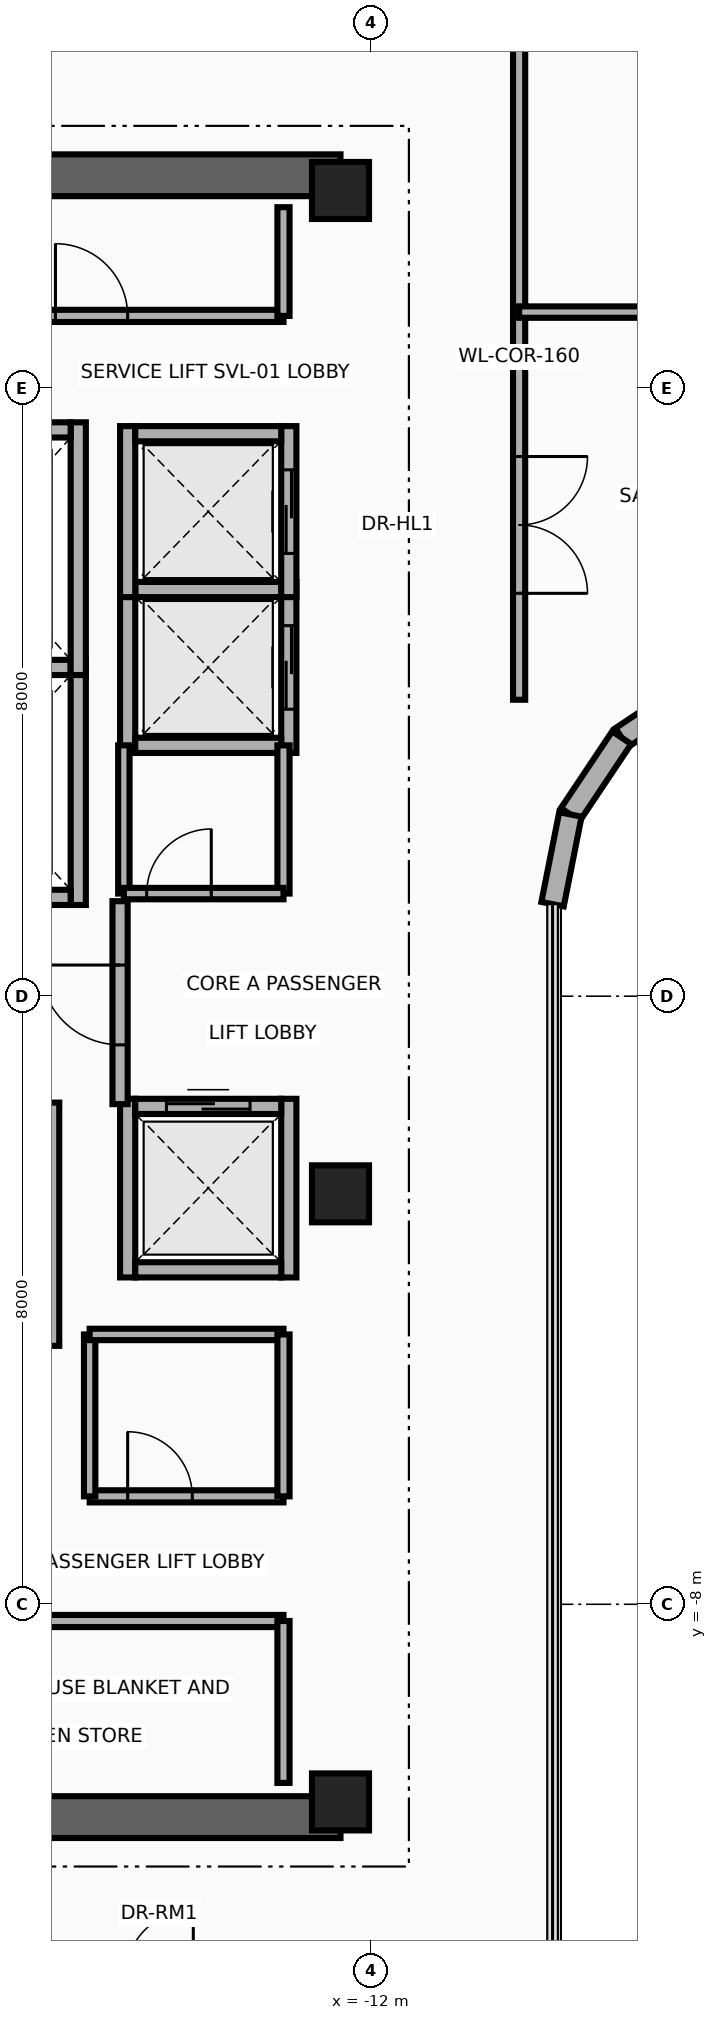
"""IFC4 building model, lengths in metres.
Left out: names, types, materials, properties, quantities, classifications, styles, units other than length and angle.
Written with IfcOpenShell. Run it as: python <this file> out.ifc"""

import sys

from ifc_helpers import new_model, si_unit, direction, frame, frame_2d, origin, origin_2d, place, context, subcontext, project, spatial, rectangle, extrude, source, transform, mapped, element, fill, save


model = new_model("IFC4")
c1 = context("Model", 3, precision=1e-05, world=origin(), true_north=direction((0.0, 1.0)))
c2 = subcontext(c1, "Body", "Model", "MODEL_VIEW")
j1 = project(units=[si_unit("LENGTHUNIT", "METRE"), si_unit("PLANEANGLEUNIT", "RADIAN")], contexts=[c1])
p1 = place(None, origin())
s1 = spatial("IfcSite", under=j1, at=p1, CompositionType="ELEMENT")
p2 = place(p1, origin())
s2 = spatial("IfcBuilding", under=s1, at=p2, CompositionType="ELEMENT")
p3 = place(p2, frame((0.0, 0.0, 290.6)))
s3 = spatial("IfcBuildingStorey", under=s2, at=p3, CompositionType="ELEMENT", Elevation=290.6)
for number, where, z_axis, x_axis in (
    (1, (-22.65, 10.8, 0.0), (0.0, 0.0, 1.0), (1.0, 0.0, 0.0)),
    (2, (-22.65, -10.8, 0.0), (0.0, 0.0, 1.0), (1.0, 0.0, 0.0)),
):
    element("IfcWall", number, at=place(p3, frame(where, z_axis=z_axis, x_axis=x_axis)), inside=s3, PredefinedType="SHEAR", context=c2, shape_type="SweptSolid", body=[
        extrude(rectangle(XDim=10.25, YDim=0.55, at=frame_2d((5.125, 0.0))), origin(), (0.0, 0.0, 1.0), 3.36),
    ])
m1 = source(origin(), c2, "Body", "SweptSolid", [
    extrude(rectangle(XDim=0.75, YDim=0.75, at=origin_2d()), origin(), (0.0, 0.0, 1.0), 3.6),
])
for number, where, z_axis, x_axis in (
    (3, (-12.4, -10.6, 0.0), (0.0, 0.0, 1.0), (1.0, 0.0, 0.0)),
    (4, (-12.4, -2.6, 0.0), (0.0, 0.0, 1.0), (1.0, 0.0, 0.0)),
    (5, (-12.4, 10.6, 0.0), (0.0, 0.0, 1.0), (1.0, 0.0, 0.0)),
):
    element("IfcColumn", number, at=place(p3, frame(where, z_axis=z_axis, x_axis=x_axis)), inside=s3, PredefinedType="COLUMN", context=c2, shape_type="MappedRepresentation", body=[
        mapped(m1, transform((0.0, 0.0, 0.0), x_axis=(1.0, 0.0, 0.0), y_axis=(0.0, 1.0, 0.0), z_axis=(0.0, 0.0, 1.0), scale=1.0)),
    ])
p4 = place(p3, frame((-7.691, 4.075, 0.0), z_axis=(0.0, 0.0, 1.0), x_axis=(-0.83152410926, -0.555488663899, 0.0)))
e6 = element("IfcWall", 6, at=p4, inside=s3, PredefinedType="SOLIDWALL", context=c2, shape_type="SweptSolid", body=[
    extrude(rectangle(XDim=1.214, YDim=0.3, at=frame_2d((0.607, 0.0))), origin(), (0.0, 0.0, 1.0), 3.36),
])
p5 = place(p3, frame((-8.701, 3.401, 0.0), z_axis=(0.0, 0.0, 1.0), x_axis=(-0.555581539313, -0.831462057568, 0.0)))
e7 = element("IfcWall", 7, at=p5, inside=s3, PredefinedType="SOLIDWALL", context=c2, shape_type="SweptSolid", body=[
    extrude(rectangle(XDim=1.214, YDim=0.3, at=frame_2d((0.607, 0.0))), origin(), (0.0, 0.0, 1.0), 3.36),
])
p6 = place(p3, frame((-9.375, 2.391, 0.0), z_axis=(0.0, 0.0, 1.0), x_axis=(-0.195140802248, -0.98077523791, 0.0)))
e8 = element("IfcWall", 8, at=p6, inside=s3, PredefinedType="SOLIDWALL", context=c2, shape_type="SweptSolid", body=[
    extrude(rectangle(XDim=1.204, YDim=0.3, at=frame_2d((0.602, 0.0))), origin(), (0.0, 0.0, 1.0), 3.36),
])
p7 = place(p3, frame((-15.85, 1.2, 0.0), z_axis=(0.0, 0.0, 1.0), x_axis=(0.0, 1.0, 0.0)))
e9 = element("IfcWall", 9, at=p7, inside=s3, PredefinedType="MOVABLE", context=c2, shape_type="SweptSolid", body=[
    extrude(rectangle(XDim=3.225, YDim=0.2, at=frame_2d((1.613, 0.0))), origin(), (0.0, 0.0, 1.0), 3.36),
])
p8 = place(p3, frame((-18.55, 1.3, 0.0), z_axis=(0.0, 0.0, 1.0), x_axis=(1.0, 0.0, 0.0)))
e10 = element("IfcWall", 10, at=p8, inside=s3, PredefinedType="MOVABLE", context=c2, shape_type="SweptSolid", body=[
    extrude(rectangle(XDim=2.6, YDim=0.2, at=frame_2d((1.3, 0.0))), origin(), (0.0, 0.0, 1.0), 3.36),
])
p9 = place(p8, frame((0.7, 0.0, 0.0)))
e11 = element("IfcOpeningElement", 11, at=p9, cuts=e10, PredefinedType="OPENING", context=c2, shape_type="SweptSolid", body=[
    extrude(rectangle(XDim=1.2, YDim=2.1, at=frame_2d((0.6, 1.05))), frame((0.0, 0.115, 0.0), z_axis=(0.0, -1.0, 0.0), x_axis=(1.0, 0.0, 0.0)), (0.0, 0.0, 1.0), 0.23),
])
p10 = place(p3, frame((-18.55, 4.325, 0.0), z_axis=(0.0, 0.0, 1.0), x_axis=(1.0, 0.0, 0.0)))
e12 = element("IfcWall", 12, at=p10, inside=s3, PredefinedType="MOVABLE", context=c2, shape_type="SweptSolid", body=[
    extrude(rectangle(XDim=2.6, YDim=0.2, at=frame_2d((1.3, 0.0))), origin(), (0.0, 0.0, 1.0), 3.36),
])
p11 = place(p3, frame((-16.2, -4.6, 0.0), z_axis=(0.0, 0.0, 1.0), x_axis=(0.0, 1.0, 0.0)))
e13 = element("IfcWall", 13, at=p11, inside=s3, PredefinedType="MOVABLE", context=c2, shape_type="SweptSolid", body=[
    extrude(rectangle(XDim=3.2, YDim=0.2, at=frame_2d((1.6, 0.0))), origin(), (0.0, 0.0, 1.0), 3.36),
])
p12 = place(p3, frame((-15.85, 4.225, 0.0), z_axis=(0.0, 0.0, 1.0), x_axis=(0.0, 1.0, 0.0)))
e14 = element("IfcWall", 14, at=p12, inside=s3, PredefinedType="MOVABLE", context=c2, shape_type="SweptSolid", body=[
    extrude(rectangle(XDim=3.325, YDim=0.2, at=frame_2d((1.663, 0.0))), origin(), (0.0, 0.0, 1.0), 3.36),
])
p13 = place(p3, frame((-18.55, 7.45, 0.0), z_axis=(0.0, 0.0, 1.0), x_axis=(1.0, 0.0, 0.0)))
e15 = element("IfcWall", 15, at=p13, inside=s3, PredefinedType="MOVABLE", context=c2, shape_type="SweptSolid", body=[
    extrude(rectangle(XDim=2.6, YDim=0.2, at=frame_2d((1.3, 0.0))), origin(), (0.0, 0.0, 1.0), 3.36),
])
p14 = place(p13, frame((0.7, 0.0, 0.0)))
e16 = element("IfcOpeningElement", 16, at=p14, cuts=e15, PredefinedType="OPENING", context=c2, shape_type="SweptSolid", body=[
    extrude(rectangle(XDim=1.2, YDim=2.1, at=frame_2d((0.6, 1.05))), frame((0.0, 0.115, 0.0), z_axis=(0.0, -1.0, 0.0), x_axis=(1.0, 0.0, 0.0)), (0.0, 0.0, 1.0), 0.23),
])
p15 = place(p3, frame((-15.2, 3.2, 0.0), z_axis=(0.0, 0.0, 1.0), x_axis=(0.0, 1.0, 0.0)))
e17 = element("IfcWall", 17, at=p15, inside=s3, PredefinedType="MOVABLE", context=c2, shape_type="SweptSolid", body=[
    extrude(rectangle(XDim=2.25, YDim=0.2, at=frame_2d((1.125, 0.0))), origin(), (0.0, 0.0, 1.0), 3.36),
])
p16 = place(p3, frame((-13.08, 3.2, 0.0), z_axis=(0.0, 0.0, 1.0), x_axis=(0.0, 1.0, 0.0)))
e18 = element("IfcWall", 18, at=p16, inside=s3, PredefinedType="MOVABLE", context=c2, shape_type="SweptSolid", body=[
    extrude(rectangle(XDim=2.25, YDim=0.2, at=frame_2d((1.125, 0.0))), origin(), (0.0, 0.0, 1.0), 3.36),
])
p17 = place(p16, frame((0.575, 0.0, 0.0)))
e19 = element("IfcOpeningElement", 19, at=p17, cuts=e18, PredefinedType="OPENING", context=c2, shape_type="SweptSolid", body=[
    extrude(rectangle(XDim=1.1, YDim=2.1, at=frame_2d((0.55, 1.05))), frame((0.0, 0.115, 0.0), z_axis=(0.0, -1.0, 0.0), x_axis=(1.0, 0.0, 0.0)), (0.0, 0.0, 1.0), 0.23),
])
for number, where, z_axis, x_axis in (
    (20, (-15.1, 3.3, 0.0), (0.0, 0.0, 1.0), (1.0, 0.0, 0.0)),
    (21, (-15.1, 5.35, 0.0), (0.0, 0.0, 1.0), (1.0, 0.0, 0.0)),
):
    element("IfcWall", number, at=place(p3, frame(where, z_axis=z_axis, x_axis=x_axis)), inside=s3, PredefinedType="MOVABLE", context=c2, shape_type="SweptSolid", body=[
        extrude(rectangle(XDim=1.92, YDim=0.2, at=frame_2d((0.96, 0.0))), origin(), (0.0, 0.0, 1.0), 3.36),
    ])
p18 = place(p3, frame((-15.2, 5.25, 0.0), z_axis=(0.0, 0.0, 1.0), x_axis=(0.0, 1.0, 0.0)))
e22 = element("IfcWall", 22, at=p18, inside=s3, PredefinedType="MOVABLE", context=c2, shape_type="SweptSolid", body=[
    extrude(rectangle(XDim=2.25, YDim=0.2, at=frame_2d((1.125, 0.0))), origin(), (0.0, 0.0, 1.0), 3.36),
])
p19 = place(p3, frame((-13.08, 5.25, 0.0), z_axis=(0.0, 0.0, 1.0), x_axis=(0.0, 1.0, 0.0)))
e23 = element("IfcWall", 23, at=p19, inside=s3, PredefinedType="MOVABLE", context=c2, shape_type="SweptSolid", body=[
    extrude(rectangle(XDim=2.25, YDim=0.2, at=frame_2d((1.125, 0.0))), origin(), (0.0, 0.0, 1.0), 3.36),
])
p20 = place(p19, frame((0.575, 0.0, 0.0)))
e24 = element("IfcOpeningElement", 24, at=p20, cuts=e23, PredefinedType="OPENING", context=c2, shape_type="SweptSolid", body=[
    extrude(rectangle(XDim=1.1, YDim=2.1, at=frame_2d((0.55, 1.05))), frame((0.0, 0.115, 0.0), z_axis=(0.0, -1.0, 0.0), x_axis=(1.0, 0.0, 0.0)), (0.0, 0.0, 1.0), 0.23),
])
p21 = place(p3, frame((-15.1, 7.4, 0.0), z_axis=(0.0, 0.0, 1.0), x_axis=(1.0, 0.0, 0.0)))
e25 = element("IfcWall", 25, at=p21, inside=s3, PredefinedType="MOVABLE", context=c2, shape_type="SweptSolid", body=[
    extrude(rectangle(XDim=1.92, YDim=0.2, at=frame_2d((0.96, 0.0))), origin(), (0.0, 0.0, 1.0), 3.36),
])
for number, where, z_axis, x_axis in (
    (26, (-15.2, -3.7, 0.0), (0.0, 0.0, 1.0), (0.0, 1.0, 0.0)),
    (27, (-13.08, -3.7, 0.0), (0.0, 0.0, 1.0), (0.0, 1.0, 0.0)),
):
    element("IfcWall", number, at=place(p3, frame(where, z_axis=z_axis, x_axis=x_axis)), inside=s3, PredefinedType="MOVABLE", context=c2, shape_type="SweptSolid", body=[
        extrude(rectangle(XDim=2.35, YDim=0.2, at=frame_2d((1.175, 0.0))), origin(), (0.0, 0.0, 1.0), 3.36),
    ])
p22 = place(p3, frame((-15.1, -3.6, 0.0), z_axis=(0.0, 0.0, 1.0), x_axis=(1.0, 0.0, 0.0)))
e28 = element("IfcWall", 28, at=p22, inside=s3, PredefinedType="MOVABLE", context=c2, shape_type="SweptSolid", body=[
    extrude(rectangle(XDim=1.92, YDim=0.2, at=frame_2d((0.96, 0.0))), origin(), (0.0, 0.0, 1.0), 3.36),
])
p23 = place(p3, frame((-15.1, -1.45, 0.0), z_axis=(0.0, 0.0, 1.0), x_axis=(1.0, 0.0, 0.0)))
e29 = element("IfcWall", 29, at=p23, inside=s3, PredefinedType="MOVABLE", context=c2, shape_type="SweptSolid", body=[
    extrude(rectangle(XDim=1.92, YDim=0.2, at=frame_2d((0.96, 0.0))), origin(), (0.0, 0.0, 1.0), 3.36),
])
p24 = place(p23, frame((0.41, 0.0, 0.0)))
e30 = element("IfcOpeningElement", 30, at=p24, cuts=e29, PredefinedType="OPENING", context=c2, shape_type="SweptSolid", body=[
    extrude(rectangle(XDim=1.1, YDim=2.1, at=frame_2d((0.55, 1.05))), frame((0.0, 0.115, 0.0), z_axis=(0.0, -1.0, 0.0), x_axis=(1.0, 0.0, 0.0)), (0.0, 0.0, 1.0), 0.23),
])
p25 = place(p3, frame((-15.3, -1.42, 0.0), z_axis=(0.0, 0.0, 1.0), x_axis=(0.0, 1.0, 0.0)))
e31 = element("IfcWall", 31, at=p25, inside=s3, PredefinedType="PARTITIONING", context=c2, shape_type="SweptSolid", body=[
    extrude(rectangle(XDim=2.67, YDim=0.2, at=frame_2d((1.335, 0.0))), origin(), (0.0, 0.0, 1.0), 3.36),
])
p26 = place(p25, frame((0.78, 0.0, 0.0)))
e32 = element("IfcOpeningElement", 32, at=p26, cuts=e31, PredefinedType="OPENING", context=c2, shape_type="SweptSolid", body=[
    extrude(rectangle(XDim=1.05, YDim=2.15, at=frame_2d((0.525, 1.075))), frame((0.0, 0.115, 0.0), z_axis=(0.0, -1.0, 0.0), x_axis=(1.0, 0.0, 0.0)), (0.0, 0.0, 1.0), 0.23),
])
p27 = place(p3, frame((-18.65, 8.95, 0.0), z_axis=(0.0, 0.0, 1.0), x_axis=(1.0, 0.0, 0.0)))
e33 = element("IfcWall", 33, at=p27, inside=s3, PredefinedType="PARTITIONING", context=c2, shape_type="SweptSolid", body=[
    extrude(rectangle(XDim=5.5, YDim=0.16, at=frame_2d((2.75, 0.0))), origin(), (0.0, 0.0, 1.0), 3.36),
])
p28 = place(p27, frame((0.3, 0.0, 0.0)))
e34 = element("IfcOpeningElement", 34, at=p28, cuts=e33, PredefinedType="OPENING", context=c2, shape_type="SweptSolid", body=[
    extrude(rectangle(XDim=0.85, YDim=2.05, at=frame_2d((0.425, 1.025))), frame((0.0, 0.095, 0.0), z_axis=(0.0, -1.0, 0.0), x_axis=(1.0, 0.0, 0.0)), (0.0, 0.0, 1.0), 0.19),
])
p29 = place(p27, frame((2.5, 0.0, 0.0)))
e35 = element("IfcOpeningElement", 35, at=p29, cuts=e33, PredefinedType="OPENING", context=c2, shape_type="SweptSolid", body=[
    extrude(rectangle(XDim=0.95, YDim=2.15, at=frame_2d((0.475, 1.075))), frame((0.0, 0.095, 0.0), z_axis=(0.0, -1.0, 0.0), x_axis=(1.0, 0.0, 0.0)), (0.0, 0.0, 1.0), 0.19),
])
p30 = place(p3, frame((-13.15, 8.95, 0.0), z_axis=(0.0, 0.0, 1.0), x_axis=(0.0, 1.0, 0.0)))
e36 = element("IfcWall", 36, at=p30, inside=s3, PredefinedType="PARTITIONING", context=c2, shape_type="SweptSolid", body=[
    extrude(rectangle(XDim=1.43, YDim=0.16, at=frame_2d((0.715, 0.0))), origin(), (0.0, 0.0, 1.0), 3.36),
])
p31 = place(p3, frame((-18.55, -8.22, 0.0), z_axis=(0.0, 0.0, 1.0), x_axis=(1.0, 0.0, 0.0)))
e37 = element("IfcWall", 37, at=p31, inside=s3, PredefinedType="PARTITIONING", context=c2, shape_type="SweptSolid", body=[
    extrude(rectangle(XDim=5.4, YDim=0.16, at=frame_2d((2.7, 0.0))), origin(), (0.0, 0.0, 1.0), 3.36),
])
p32 = place(p31, frame((1.15, 0.0, 0.0)))
e38 = element("IfcOpeningElement", 38, at=p32, cuts=e37, PredefinedType="OPENING", context=c2, shape_type="SweptSolid", body=[
    extrude(rectangle(XDim=0.95, YDim=2.15, at=frame_2d((0.475, 1.075))), frame((0.0, 0.095, 0.0), z_axis=(0.0, -1.0, 0.0), x_axis=(1.0, 0.0, 0.0)), (0.0, 0.0, 1.0), 0.19),
])
p33 = place(p3, frame((-13.15, -10.35, 0.0), z_axis=(0.0, 0.0, 1.0), x_axis=(0.0, 1.0, 0.0)))
e39 = element("IfcWall", 39, at=p33, inside=s3, PredefinedType="PARTITIONING", context=c2, shape_type="SweptSolid", body=[
    extrude(rectangle(XDim=2.13, YDim=0.16, at=frame_2d((1.065, 0.0))), origin(), (0.0, 0.0, 1.0), 3.36),
])
p34 = place(p3, frame((-15.7, -6.58, 0.0), z_axis=(0.0, 0.0, 1.0), x_axis=(1.0, 0.0, 0.0)))
e40 = element("IfcWall", 40, at=p34, inside=s3, PredefinedType="PARTITIONING", context=c2, shape_type="SweptSolid", body=[
    extrude(rectangle(XDim=2.55, YDim=0.16, at=frame_2d((1.275, 0.0))), origin(), (0.0, 0.0, 1.0), 3.36),
])
p35 = place(p34, frame((0.5, 0.0, 0.0)))
e41 = element("IfcOpeningElement", 41, at=p35, cuts=e40, PredefinedType="OPENING", context=c2, shape_type="SweptSolid", body=[
    extrude(rectangle(XDim=0.85, YDim=2.05, at=frame_2d((0.425, 1.025))), frame((0.0, 0.095, 0.0), z_axis=(0.0, -1.0, 0.0), x_axis=(1.0, 0.0, 0.0)), (0.0, 0.0, 1.0), 0.19),
])
p36 = place(p3, frame((-15.7, -6.58, 0.0), z_axis=(0.0, 0.0, 1.0), x_axis=(0.0, 1.0, 0.0)))
e42 = element("IfcWall", 42, at=p36, inside=s3, PredefinedType="PARTITIONING", context=c2, shape_type="SweptSolid", body=[
    extrude(rectangle(XDim=2.13, YDim=0.15, at=frame_2d((1.065, 0.0))), origin(), (0.0, 0.0, 1.0), 3.36),
])
p37 = place(p3, frame((-15.7, -4.45, 0.0), z_axis=(0.0, 0.0, 1.0), x_axis=(1.0, 0.0, 0.0)))
e43 = element("IfcWall", 43, at=p37, inside=s3, PredefinedType="PARTITIONING", context=c2, shape_type="SweptSolid", body=[
    extrude(rectangle(XDim=2.55, YDim=0.15, at=frame_2d((1.275, 0.0))), origin(), (0.0, 0.0, 1.0), 3.36),
])
p38 = place(p3, frame((-13.15, -6.58, 0.0), z_axis=(0.0, 0.0, 1.0), x_axis=(0.0, 1.0, 0.0)))
e44 = element("IfcWall", 44, at=p38, inside=s3, PredefinedType="PARTITIONING", context=c2, shape_type="SweptSolid", body=[
    extrude(rectangle(XDim=2.13, YDim=0.16, at=frame_2d((1.065, 0.0))), origin(), (0.0, 0.0, 1.0), 3.36),
])
p39 = place(p3, frame((-13.15, 1.35, 0.0), z_axis=(0.0, 0.0, 1.0), x_axis=(0.0, 1.0, 0.0)))
e45 = element("IfcWall", 45, at=p39, inside=s3, PredefinedType="PARTITIONING", context=c2, shape_type="SweptSolid", body=[
    extrude(rectangle(XDim=1.95, YDim=0.16, at=frame_2d((0.975, 0.0))), origin(), (0.0, 0.0, 1.0), 3.36),
])
p40 = place(p3, frame((-15.25, 1.35, 0.0), z_axis=(0.0, 0.0, 1.0), x_axis=(0.0, 1.0, 0.0)))
e46 = element("IfcWall", 46, at=p40, inside=s3, PredefinedType="PARTITIONING", context=c2, shape_type="SweptSolid", body=[
    extrude(rectangle(XDim=1.95, YDim=0.15, at=frame_2d((0.975, 0.0))), origin(), (0.0, 0.0, 1.0), 3.36),
])
p41 = place(p3, frame((-15.25, 1.35, 0.0), z_axis=(0.0, 0.0, 1.0), x_axis=(1.0, 0.0, 0.0)))
e47 = element("IfcWall", 47, at=p41, inside=s3, PredefinedType="PARTITIONING", context=c2, shape_type="SweptSolid", body=[
    extrude(rectangle(XDim=2.1, YDim=0.15, at=frame_2d((1.05, 0.0))), origin(), (0.0, 0.0, 1.0), 3.36),
])
p42 = place(p41, frame((0.3, 0.0, 0.0)))
e48 = element("IfcOpeningElement", 48, at=p42, cuts=e47, PredefinedType="OPENING", context=c2, shape_type="SweptSolid", body=[
    extrude(rectangle(XDim=0.85, YDim=2.05, at=frame_2d((0.425, 1.025))), frame((0.0, 0.09, 0.0), z_axis=(0.0, -1.0, 0.0), x_axis=(1.0, 0.0, 0.0)), (0.0, 0.0, 1.0), 0.18),
])
p43 = place(p3, frame((-10.05, 3.9, 0.0), z_axis=(0.0, 0.0, 1.0), x_axis=(0.0, 1.0, 0.0)))
e49 = element("IfcWall", 49, at=p43, inside=s3, PredefinedType="PARTITIONING", context=c2, shape_type="SweptSolid", body=[
    extrude(rectangle(XDim=9.02, YDim=0.16, at=frame_2d((4.51, 0.0))), origin(), (0.0, 0.0, 1.0), 3.36),
])
p44 = place(p43, frame((1.4, 0.0, 0.0)))
e50 = element("IfcOpeningElement", 50, at=p44, cuts=e49, PredefinedType="OPENING", context=c2, shape_type="SweptSolid", body=[
    extrude(rectangle(XDim=1.8, YDim=2.15, at=frame_2d((0.9, 1.075))), frame((0.0, 0.095, 0.0), z_axis=(0.0, -1.0, 0.0), x_axis=(1.0, 0.0, 0.0)), (0.0, 0.0, 1.0), 0.19),
])
p45 = place(p3, frame((-10.05, 9.0, 0.0), z_axis=(0.0, 0.0, 1.0), x_axis=(1.0, 0.0, 0.0)))
e51 = element("IfcWall", 51, at=p45, inside=s3, PredefinedType="PARTITIONING", context=c2, shape_type="SweptSolid", body=[
    extrude(rectangle(XDim=8.44, YDim=0.15, at=frame_2d((4.22, 0.0))), origin(), (0.0, 0.0, 1.0), 3.36),
])
p46 = place(p45, frame((2.5, 0.0, 0.0)))
e52 = element("IfcOpeningElement", 52, at=p46, cuts=e51, PredefinedType="OPENING", context=c2, shape_type="SweptSolid", body=[
    extrude(rectangle(XDim=0.9, YDim=2.1, at=frame_2d((0.45, 1.05))), frame((0.0, 0.09, 0.0), z_axis=(0.0, -1.0, 0.0), x_axis=(1.0, 0.0, 0.0)), (0.0, 0.0, 1.0), 0.18),
])
p47 = place(p17, origin())
e53 = element("IfcDoor", 53, at=p47, inside=s3, OperationType="DOUBLE_DOOR_SLIDING", PredefinedType="DOOR", context=c2, shape_type="SweptSolid", body=[
    extrude(rectangle(XDim=1.1, YDim=2.1, at=frame_2d((0.55, 1.05))), frame((0.0, 0.025, 0.0), z_axis=(0.0, -1.0, 0.0), x_axis=(1.0, 0.0, 0.0)), (0.0, 0.0, 1.0), 0.05),
])
fill(e19, e53)
p48 = place(p20, origin())
e54 = element("IfcDoor", 54, at=p48, inside=s3, OperationType="DOUBLE_DOOR_SLIDING", PredefinedType="DOOR", context=c2, shape_type="SweptSolid", body=[
    extrude(rectangle(XDim=1.1, YDim=2.1, at=frame_2d((0.55, 1.05))), frame((0.0, 0.025, 0.0), z_axis=(0.0, -1.0, 0.0), x_axis=(1.0, 0.0, 0.0)), (0.0, 0.0, 1.0), 0.05),
])
fill(e24, e54)
p49 = place(p24, origin())
e55 = element("IfcDoor", 55, at=p49, inside=s3, OperationType="DOUBLE_DOOR_SLIDING", PredefinedType="DOOR", context=c2, shape_type="SweptSolid", body=[
    extrude(rectangle(XDim=1.1, YDim=2.1, at=frame_2d((0.55, 1.05))), frame((0.0, 0.025, 0.0), z_axis=(0.0, -1.0, 0.0), x_axis=(1.0, 0.0, 0.0)), (0.0, 0.0, 1.0), 0.05),
])
fill(e30, e55)
p50 = place(p26, origin())
e56 = element("IfcDoor", 56, at=p50, inside=s3, OperationType="SINGLE_SWING_RIGHT", PredefinedType="DOOR", context=c2, shape_type="SweptSolid", body=[
    extrude(rectangle(XDim=1.05, YDim=2.15, at=frame_2d((0.525, 1.075))), frame((0.0, 0.025, 0.0), z_axis=(0.0, -1.0, 0.0), x_axis=(1.0, 0.0, 0.0)), (0.0, 0.0, 1.0), 0.05),
])
fill(e32, e56)
p51 = place(p29, origin())
e57 = element("IfcDoor", 57, at=p51, inside=s3, OperationType="SINGLE_SWING_RIGHT", PredefinedType="DOOR", context=c2, shape_type="SweptSolid", body=[
    extrude(rectangle(XDim=0.95, YDim=2.15, at=frame_2d((0.475, 1.075))), frame((0.0, 0.025, 0.0), z_axis=(0.0, -1.0, 0.0), x_axis=(1.0, 0.0, 0.0)), (0.0, 0.0, 1.0), 0.05),
])
fill(e35, e57)
p52 = place(p35, origin())
e58 = element("IfcDoor", 58, at=p52, inside=s3, OperationType="SINGLE_SWING_RIGHT", PredefinedType="DOOR", context=c2, shape_type="SweptSolid", body=[
    extrude(rectangle(XDim=0.85, YDim=2.05, at=frame_2d((0.425, 1.025))), frame((0.0, 0.025, 0.0), z_axis=(0.0, -1.0, 0.0), x_axis=(1.0, 0.0, 0.0)), (0.0, 0.0, 1.0), 0.05),
])
fill(e41, e58)
p53 = place(p42, origin())
e59 = element("IfcDoor", 59, at=p53, inside=s3, OperationType="SINGLE_SWING_LEFT", PredefinedType="DOOR", context=c2, shape_type="SweptSolid", body=[
    extrude(rectangle(XDim=0.85, YDim=2.05, at=frame_2d((0.425, 1.025))), frame((0.0, 0.025, 0.0), z_axis=(0.0, -1.0, 0.0), x_axis=(1.0, 0.0, 0.0)), (0.0, 0.0, 1.0), 0.05),
])
fill(e48, e59)
p54 = place(p44, frame((1.8, 0.0, 0.0), z_axis=(0.0, 0.0, 1.0), x_axis=(-1.0, 0.0, 0.0)))
e60 = element("IfcDoor", 60, at=p54, inside=s3, OperationType="DOUBLE_DOOR_SINGLE_SWING", PredefinedType="DOOR", context=c2, shape_type="SweptSolid", body=[
    extrude(rectangle(XDim=1.8, YDim=2.15, at=frame_2d((0.9, 1.075))), frame((0.0, 0.025, 0.0), z_axis=(0.0, -1.0, 0.0), x_axis=(1.0, 0.0, 0.0)), (0.0, 0.0, 1.0), 0.05),
])
fill(e50, e60)
save(model, sys.argv[1])
